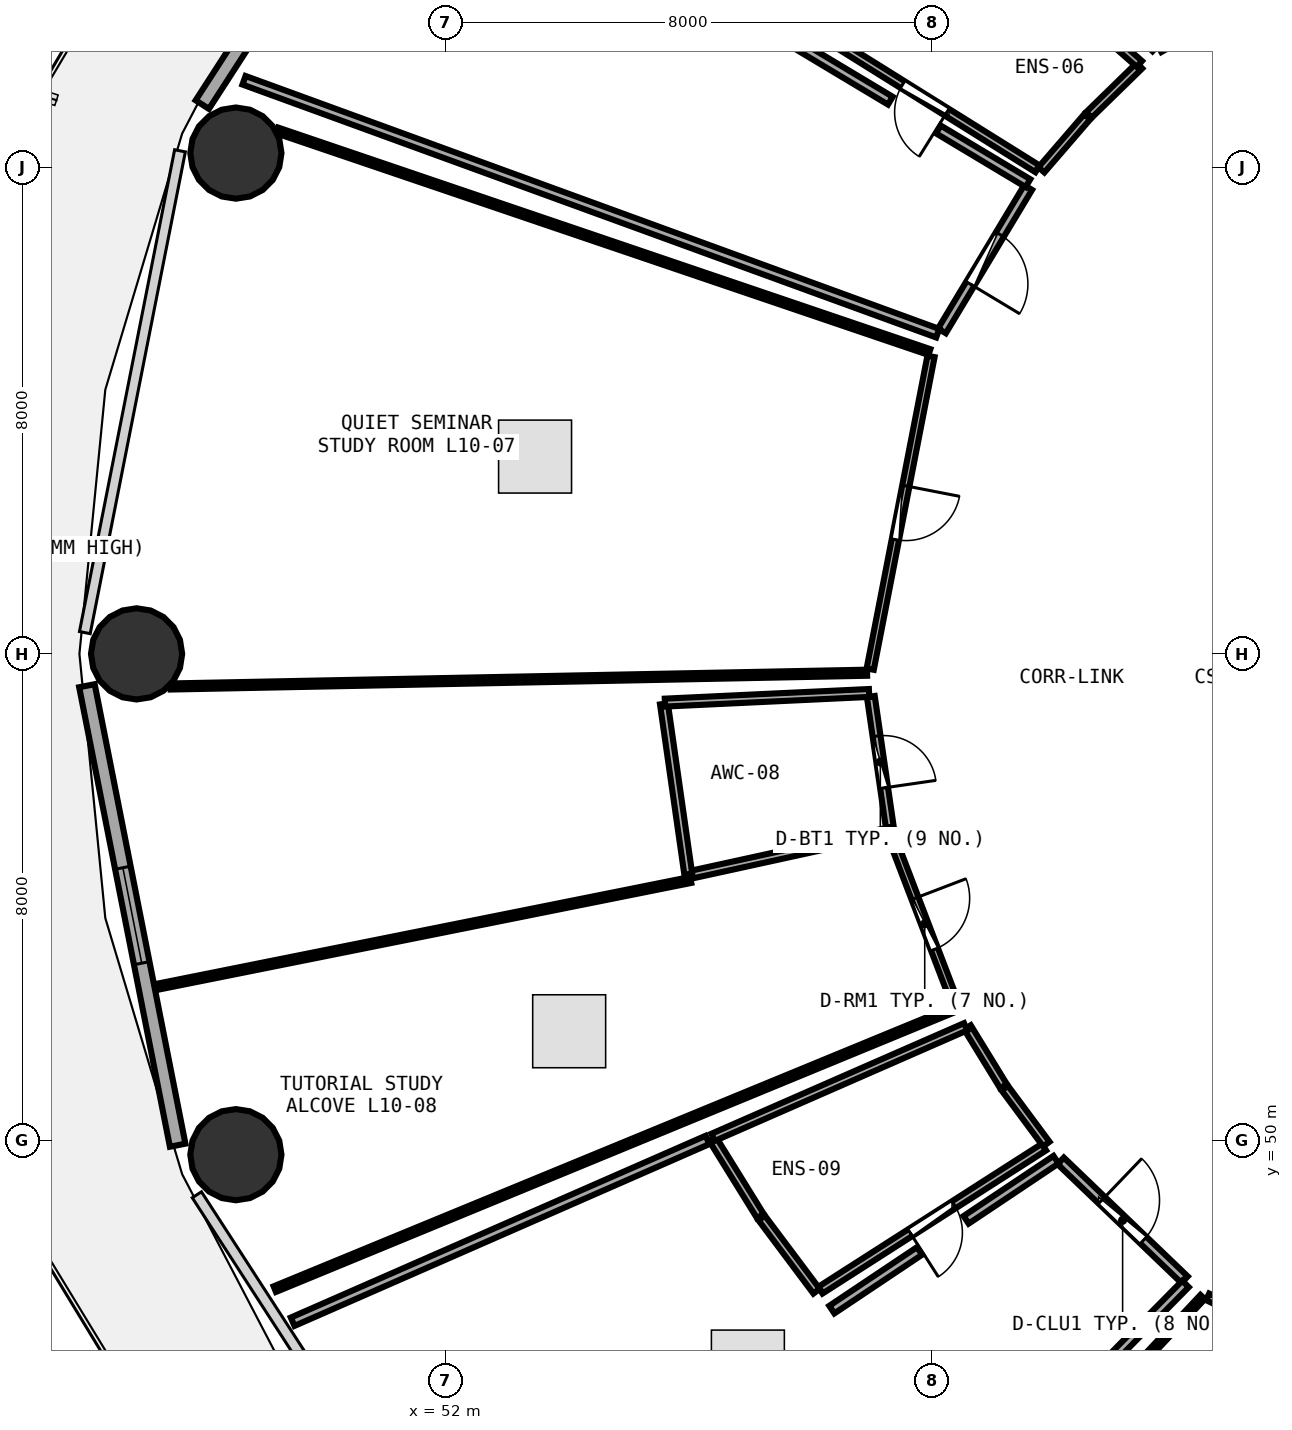
"""IFC4 building model, lengths in metres.
Left out: names, types, materials, properties, quantities, classifications, styles, units other than length and angle.
Written with IfcOpenShell. Run it as: python <this file> out.ifc"""

import sys

from ifc_helpers import new_model, si_unit, direction, frame, frame_2d, origin, origin_2d, place, context, subcontext, project, spatial, rectangle, circle, extrude, element, fill, save


model = new_model("IFC4")
c1 = context("Model", 3, precision=1e-05, world=origin(), true_north=direction((0.0, 1.0)))
c2 = subcontext(c1, "Body", "Model", "MODEL_VIEW")
j1 = project(units=[si_unit("LENGTHUNIT", "METRE"), si_unit("PLANEANGLEUNIT", "RADIAN")], contexts=[c1])
p1 = place(None, origin())
s1 = spatial("IfcSite", under=j1, at=p1, CompositionType="ELEMENT")
p2 = place(p1, origin())
s2 = spatial("IfcBuilding", under=s1, at=p2, CompositionType="ELEMENT")
p3 = place(p2, frame((0.0, 0.0, 41.25)))
s3 = spatial("IfcBuildingStorey", under=s2, at=p3, CompositionType="ELEMENT", Elevation=41.25)
for number, where, z_axis, x_axis in (
    (1, (48.553, 66.236, 0.0), (0.0, 0.0, 1.0), (1.0, 0.0, 0.0)),
    (2, (46.92, 58.0, 0.0), (0.0, 0.0, 1.0), (1.0, 0.0, 0.0)),
    (3, (48.553, 49.764, 0.0), (0.0, 0.0, 1.0), (1.0, 0.0, 0.0)),
):
    element("IfcColumn", number, at=place(p3, frame(where, z_axis=z_axis, x_axis=x_axis)), inside=s3, PredefinedType="COLUMN", context=c2, shape_type="SweptSolid", body=[
        extrude(circle(Radius=0.75, at=origin_2d()), origin(), (0.0, 0.0, 1.0), 3.75),
    ])
p4 = place(p3, frame((52.311, 73.698, 0.0), z_axis=(0.0, 0.0, 1.0), x_axis=(-0.543005114258, -0.839729388488, 0.0)))
e4 = element("IfcWall", 4, at=p4, inside=s3, PredefinedType="SOLIDWALL", context=c2, shape_type="SweptSolid", body=[
    extrude(rectangle(XDim=7.938, YDim=0.26, at=frame_2d((3.969, 0.0))), origin(), (0.0, 0.0, 1.0), 3.475),
])
p5 = place(p4, frame((3.494, 0.0, 0.0)))
e5 = element("IfcOpeningElement", 5, at=p5, cuts=e4, PredefinedType="OPENING", context=c2, shape_type="SweptSolid", body=[
    extrude(rectangle(XDim=0.95, YDim=2.1, at=frame_2d((0.475, 1.05))), frame((0.0, 0.14, 0.0), z_axis=(0.0, -1.0, 0.0), x_axis=(1.0, 0.0, 0.0)), (0.0, 0.0, 1.0), 0.28),
])
p6 = place(p4, frame((4.794, 0.0, 0.85)))
e6 = element("IfcOpeningElement", 6, at=p6, cuts=e4, PredefinedType="OPENING", context=c2, shape_type="SweptSolid", body=[
    extrude(rectangle(XDim=1.2, YDim=1.45, at=frame_2d((0.6, 0.725))), frame((0.0, 0.14, 0.0), z_axis=(0.0, -1.0, 0.0), x_axis=(1.0, 0.0, 0.0)), (0.0, 0.0, 1.0), 0.28),
])
p7 = place(p3, frame((46.104, 57.477, 0.0), z_axis=(0.0, 0.0, 1.0), x_axis=(0.193726159581, -0.98105564322, 0.0)))
e7 = element("IfcWall", 7, at=p7, inside=s3, PredefinedType="SOLIDWALL", context=c2, shape_type="SweptSolid", body=[
    extrude(rectangle(XDim=7.703, YDim=0.26, at=frame_2d((3.851, 0.0))), origin(), (0.0, 0.0, 1.0), 3.475),
])
p8 = place(p7, frame((3.051, 0.0, 0.85)))
e8 = element("IfcOpeningElement", 8, at=p8, cuts=e7, PredefinedType="OPENING", context=c2, shape_type="SweptSolid", body=[
    extrude(rectangle(XDim=1.6, YDim=1.45, at=frame_2d((0.8, 0.725))), frame((0.0, 0.14, 0.0), z_axis=(0.0, -1.0, 0.0), x_axis=(1.0, 0.0, 0.0)), (0.0, 0.0, 1.0), 0.28),
])
p9 = place(p3, frame((61.737, 65.977, 0.0), z_axis=(0.0, 0.0, 1.0), x_axis=(-0.848252205707, 0.529592480605, 0.0)))
e9 = element("IfcWall", 9, at=p9, inside=s3, PredefinedType="PLUMBINGWALL", context=c2, shape_type="SweptSolid", body=[
    extrude(rectangle(XDim=4.374, YDim=0.13, at=frame_2d((2.187, 0.0))), origin(), (0.0, 0.0, 1.0), 3.235),
])
p10 = place(p9, frame((1.757, 0.0, 0.0)))
e10 = element("IfcOpeningElement", 10, at=p10, cuts=e9, PredefinedType="OPENING", context=c2, shape_type="SweptSolid", body=[
    extrude(rectangle(XDim=0.86, YDim=2.05, at=frame_2d((0.43, 1.025))), frame((0.0, 0.075, 0.0), z_axis=(0.0, -1.0, 0.0), x_axis=(1.0, 0.0, 0.0)), (0.0, 0.0, 1.0), 0.15),
])
p11 = place(p3, frame((61.583, 65.67, 0.0), z_axis=(0.0, 0.0, 1.0), x_axis=(-0.515343511704, -0.85698370168, 0.0)))
e11 = element("IfcWall", 11, at=p11, inside=s3, PredefinedType="PARTITIONING", context=c2, shape_type="SweptSolid", body=[
    extrude(rectangle(XDim=2.752, YDim=0.15, at=frame_2d((1.376, 0.0))), origin(), (0.0, 0.0, 1.0), 2.875),
])
p12 = place(p11, frame((0.901, 0.0, 0.0)))
e12 = element("IfcOpeningElement", 12, at=p12, cuts=e11, PredefinedType="OPENING", context=c2, shape_type="SweptSolid", body=[
    extrude(rectangle(XDim=0.95, YDim=2.08, at=frame_2d((0.475, 1.04))), frame((0.0, 0.085, 0.0), z_axis=(0.0, -1.0, 0.0), x_axis=(1.0, 0.0, 0.0)), (0.0, 0.0, 1.0), 0.17),
])
p13 = place(p3, frame((59.986, 62.892, 0.0), z_axis=(0.0, 0.0, 1.0), x_axis=(-0.190897102704, -0.981610053015, 0.0)))
e13 = element("IfcWall", 13, at=p13, inside=s3, PredefinedType="PARTITIONING", context=c2, shape_type="SweptSolid", body=[
    extrude(rectangle(XDim=5.239, YDim=0.12, at=frame_2d((2.619, 0.0))), origin(), (0.0, 0.0, 1.0), 2.875),
])
p14 = place(p13, frame((2.169, 0.0, 0.0)))
e14 = element("IfcOpeningElement", 14, at=p14, cuts=e13, PredefinedType="OPENING", context=c2, shape_type="SweptSolid", body=[
    extrude(rectangle(XDim=0.9, YDim=2.08, at=frame_2d((0.45, 1.04))), frame((0.0, 0.07, 0.0), z_axis=(0.0, -1.0, 0.0), x_axis=(1.0, 0.0, 0.0)), (0.0, 0.0, 1.0), 0.14),
])
p15 = place(p3, frame((58.996, 57.299, 0.0), z_axis=(0.0, 0.0, 1.0), x_axis=(0.143746038715, -0.989614610014, 0.0)))
e15 = element("IfcWall", 15, at=p15, inside=s3, PredefinedType="PLUMBINGWALL", context=c2, shape_type="SweptSolid", body=[
    extrude(rectangle(XDim=2.176, YDim=0.13, at=frame_2d((1.088, 0.0))), origin(), (0.0, 0.0, 1.0), 3.48),
])
p16 = place(p15, frame((0.658, 0.0, 0.0)))
e16 = element("IfcOpeningElement", 16, at=p16, cuts=e15, PredefinedType="OPENING", context=c2, shape_type="SweptSolid", body=[
    extrude(rectangle(XDim=0.86, YDim=2.05, at=frame_2d((0.43, 1.025))), frame((0.0, 0.075, 0.0), z_axis=(0.0, -1.0, 0.0), x_axis=(1.0, 0.0, 0.0)), (0.0, 0.0, 1.0), 0.15),
])
p17 = place(p3, frame((59.373, 54.891, 0.0), z_axis=(0.0, 0.0, 1.0), x_axis=(0.357203455119, -0.934026601147, 0.0)))
e17 = element("IfcWall", 17, at=p17, inside=s3, PredefinedType="PARTITIONING", context=c2, shape_type="SweptSolid", body=[
    extrude(rectangle(XDim=2.848, YDim=0.12, at=frame_2d((1.424, 0.0))), origin(), (0.0, 0.0, 1.0), 3.48),
])
p18 = place(p17, frame((0.974, 0.0, 0.0)))
e18 = element("IfcOpeningElement", 18, at=p18, cuts=e17, PredefinedType="OPENING", context=c2, shape_type="SweptSolid", body=[
    extrude(rectangle(XDim=0.9, YDim=2.08, at=frame_2d((0.45, 1.04))), frame((0.0, 0.07, 0.0), z_axis=(0.0, -1.0, 0.0), x_axis=(1.0, 0.0, 0.0)), (0.0, 0.0, 1.0), 0.14),
])
p19 = place(p3, frame((61.844, 49.89, 0.0), z_axis=(0.0, 0.0, 1.0), x_axis=(-0.842235862163, -0.539109221297, 0.0)))
e19 = element("IfcWall", 19, at=p19, inside=s3, PredefinedType="PLUMBINGWALL", context=c2, shape_type="SweptSolid", body=[
    extrude(rectangle(XDim=4.367, YDim=0.13, at=frame_2d((2.184, 0.0))), origin(), (0.0, 0.0, 1.0), 3.235),
])
p20 = place(p19, frame((1.754, 0.0, 0.0)))
e20 = element("IfcOpeningElement", 20, at=p20, cuts=e19, PredefinedType="OPENING", context=c2, shape_type="SweptSolid", body=[
    extrude(rectangle(XDim=0.86, YDim=2.05, at=frame_2d((0.43, 1.025))), frame((0.0, 0.075, 0.0), z_axis=(0.0, -1.0, 0.0), x_axis=(1.0, 0.0, 0.0)), (0.0, 0.0, 1.0), 0.15),
])
p21 = place(p3, frame((62.118, 49.663, 0.0), z_axis=(0.0, 0.0, 1.0), x_axis=(0.721698326825, -0.692207718144, 0.0)))
e21 = element("IfcWall", 21, at=p21, inside=s3, PredefinedType="PARTITIONING", context=c2, shape_type="SweptSolid", body=[
    extrude(rectangle(XDim=2.823, YDim=0.15, at=frame_2d((1.412, 0.0))), origin(), (0.0, 0.0, 1.0), 2.875),
])
p22 = place(p21, frame((0.936, 0.0, 0.0)))
e22 = element("IfcOpeningElement", 22, at=p22, cuts=e21, PredefinedType="OPENING", context=c2, shape_type="SweptSolid", body=[
    extrude(rectangle(XDim=0.95, YDim=2.08, at=frame_2d((0.475, 1.04))), frame((0.0, 0.085, 0.0), z_axis=(0.0, -1.0, 0.0), x_axis=(1.0, 0.0, 0.0)), (0.0, 0.0, 1.0), 0.17),
])
p23 = place(p3, frame((64.534, 47.427, 0.0), z_axis=(0.0, 0.0, 1.0), x_axis=(0.900751487373, -0.434334845477, 0.0)))
e23 = element("IfcWall", 23, at=p23, inside=s3, PredefinedType="PARTITIONING", context=c2, shape_type="SweptSolid", body=[
    extrude(rectangle(XDim=5.654, YDim=0.12, at=frame_2d((2.827, 0.0))), origin(), (0.0, 0.0, 1.0), 2.875),
])
p24 = place(p23, frame((2.377, 0.0, 0.0)))
e24 = element("IfcOpeningElement", 24, at=p24, cuts=e23, PredefinedType="OPENING", context=c2, shape_type="SweptSolid", body=[
    extrude(rectangle(XDim=0.9, YDim=2.08, at=frame_2d((0.45, 1.04))), frame((0.0, 0.07, 0.0), z_axis=(0.0, -1.0, 0.0), x_axis=(1.0, 0.0, 0.0)), (0.0, 0.0, 1.0), 0.14),
])
p25 = place(p3, frame((63.414, 67.674, 0.0), z_axis=(0.0, 0.0, 1.0), x_axis=(-0.715868961368, -0.698234652642, 0.0)))
e25 = element("IfcWall", 25, at=p25, inside=s3, PredefinedType="PLUMBINGWALL", context=c2, shape_type="SweptSolid", body=[
    extrude(rectangle(XDim=1.163, YDim=0.13, at=frame_2d((0.582, 0.0))), origin(), (0.0, 0.0, 1.0), 2.875),
])
p26 = place(p3, frame((62.554, 66.833, 0.0), z_axis=(0.0, 0.0, 1.0), x_axis=(-0.6531951623, -0.757189593133, 0.0)))
e26 = element("IfcWall", 26, at=p26, inside=s3, PredefinedType="PLUMBINGWALL", context=c2, shape_type="SweptSolid", body=[
    extrude(rectangle(XDim=1.153, YDim=0.13, at=frame_2d((0.576, 0.0))), origin(), (0.0, 0.0, 1.0), 3.48),
])
p27 = place(p3, frame((60.143, 70.577, 0.0), z_axis=(0.0, 0.0, 1.0), x_axis=(0.750928130077, -0.660383936403, 0.0)))
e27 = element("IfcWall", 27, at=p27, inside=s3, PredefinedType="PLUMBINGWALL", context=c2, shape_type="SweptSolid", body=[
    extrude(rectangle(XDim=4.355, YDim=0.13, at=frame_2d((2.177, 0.0))), origin(), (0.0, 0.0, 1.0), 3.235),
])
p28 = place(p3, frame((60.096, 63.274, 0.0), z_axis=(0.0, 0.0, 1.0), x_axis=(-0.939512545551, 0.342514491304, 0.0)))
e28 = element("IfcWall", 28, at=p28, inside=s3, PredefinedType="PARTITIONING", context=c2, shape_type="SweptSolid", body=[
    extrude(rectangle(XDim=12.145, YDim=0.15, at=frame_2d((6.072, 0.0))), origin(), (0.0, 0.0, 1.0), 2.875),
])
p29 = place(p3, frame((57.75, 68.036, 0.0), z_axis=(0.0, 0.0, 1.0), x_axis=(0.857787746423, -0.514004068161, 0.0)))
e29 = element("IfcWall", 29, at=p29, inside=s3, PredefinedType="PARTITIONING", context=c2, shape_type="SweptSolid", body=[
    extrude(rectangle(XDim=1.826, YDim=0.15, at=frame_2d((0.913, 0.0))), origin(), (0.0, 0.0, 1.0), 3.48),
])
p30 = place(p3, frame((60.106, 66.625, 0.0), z_axis=(0.0, 0.0, 1.0), x_axis=(0.8577560852, -0.514056901814, 0.0)))
e30 = element("IfcWall", 30, at=p30, inside=s3, PredefinedType="PARTITIONING", context=c2, shape_type="SweptSolid", body=[
    extrude(rectangle(XDim=1.718, YDim=0.15, at=frame_2d((0.859, 0.0))), origin(), (0.0, 0.0, 1.0), 3.235),
])
p31 = place(p3, frame((58.934, 57.69, 0.0), z_axis=(0.0, 0.0, 1.0), x_axis=(-0.999804870307, -0.019754020094, 0.0)))
e31 = element("IfcWall", 31, at=p31, inside=s3, PredefinedType="PARTITIONING", context=c2, shape_type="SweptSolid", body=[
    extrude(rectangle(XDim=11.457, YDim=0.1, at=frame_2d((5.729, 0.0))), origin(), (0.0, 0.0, 1.0), 3.175),
])
p32 = place(p3, frame((49.233, 66.608, 0.0), z_axis=(0.0, 0.0, 1.0), x_axis=(0.946848647549, -0.321679403499, 0.0)))
e32 = element("IfcWall", 32, at=p32, inside=s3, PredefinedType="PARTITIONING", context=c2, shape_type="SweptSolid", body=[
    extrude(rectangle(XDim=11.328, YDim=0.1, at=frame_2d((5.664, 0.0))), origin(), (0.0, 0.0, 1.0), 2.875),
])
p33 = place(p3, frame((59.298, 55.082, 0.0), z_axis=(0.0, 0.0, 1.0), x_axis=(-0.97686777226, -0.213844231907, 0.0)))
e33 = element("IfcWall", 33, at=p33, inside=s3, PredefinedType="PLUMBINGWALL", context=c2, shape_type="SweptSolid", body=[
    extrude(rectangle(XDim=3.36, YDim=0.13, at=frame_2d((1.68, 0.0))), origin(), (0.0, 0.0, 1.0), 3.235),
])
p34 = place(p3, frame((55.993, 54.379, 0.0), z_axis=(0.0, 0.0, 1.0), x_axis=(-0.141590572172, 0.989925305198, 0.0)))
e34 = element("IfcWall", 34, at=p34, inside=s3, PredefinedType="PLUMBINGWALL", context=c2, shape_type="SweptSolid", body=[
    extrude(rectangle(XDim=2.828, YDim=0.13, at=frame_2d((1.414, 0.0))), origin(), (0.0, 0.0, 1.0), 3.48),
])
p35 = place(p3, frame((55.61, 57.199, 0.0), z_axis=(0.0, 0.0, 1.0), x_axis=(0.998891356447, 0.04707502538, 0.0)))
e35 = element("IfcWall", 35, at=p35, inside=s3, PredefinedType="PLUMBINGWALL", context=c2, shape_type="SweptSolid", body=[
    extrude(rectangle(XDim=3.361, YDim=0.13, at=frame_2d((1.68, 0.0))), origin(), (0.0, 0.0, 1.0), 3.235),
])
p36 = place(p3, frame((60.375, 52.16, 0.0), z_axis=(0.0, 0.0, 1.0), x_axis=(-0.924608681042, -0.380918346817, 0.0)))
e36 = element("IfcWall", 36, at=p36, inside=s3, PredefinedType="PARTITIONING", context=c2, shape_type="SweptSolid", body=[
    extrude(rectangle(XDim=12.094, YDim=0.1, at=frame_2d((6.047, 0.0))), origin(), (0.0, 0.0, 1.0), 2.875),
])
p37 = place(p3, frame((47.257, 52.525, 0.0), z_axis=(0.0, 0.0, 1.0), x_axis=(0.980535537362, 0.196341691878, 0.0)))
e37 = element("IfcWall", 37, at=p37, inside=s3, PredefinedType="PARTITIONING", context=c2, shape_type="SweptSolid", body=[
    extrude(rectangle(XDim=8.95, YDim=0.1, at=frame_2d((4.475, 0.0))), origin(), (0.0, 0.0, 1.0), 2.875),
])
p38 = place(p3, frame((60.583, 51.859, 0.0), z_axis=(0.0, 0.0, 1.0), x_axis=(0.52310141153, -0.852270446077, 0.0)))
e38 = element("IfcWall", 38, at=p38, inside=s3, PredefinedType="PLUMBINGWALL", context=c2, shape_type="SweptSolid", body=[
    extrude(rectangle(XDim=1.135, YDim=0.13, at=frame_2d((0.568, 0.0))), origin(), (0.0, 0.0, 1.0), 3.48),
])
p39 = place(p3, frame((61.2, 50.858, 0.0), z_axis=(0.0, 0.0, 1.0), x_axis=(0.595625136946, -0.803262532574, 0.0)))
e39 = element("IfcWall", 39, at=p39, inside=s3, PredefinedType="PLUMBINGWALL", context=c2, shape_type="SweptSolid", body=[
    extrude(rectangle(XDim=1.145, YDim=0.13, at=frame_2d((0.573, 0.0))), origin(), (0.0, 0.0, 1.0), 2.875),
])
p40 = place(p3, frame((58.103, 47.519, 0.0), z_axis=(0.0, 0.0, 1.0), x_axis=(-0.599662382917, 0.800253101533, 0.0)))
e40 = element("IfcWall", 40, at=p40, inside=s3, PredefinedType="PLUMBINGWALL", context=c2, shape_type="SweptSolid", body=[
    extrude(rectangle(XDim=1.504, YDim=0.13, at=frame_2d((0.752, 0.0))), origin(), (0.0, 0.0, 1.0), 3.48),
])
p41 = place(p3, frame((57.178, 48.756, 0.0), z_axis=(0.0, 0.0, 1.0), x_axis=(-0.526861637299, 0.849951066323, 0.0)))
e41 = element("IfcWall", 41, at=p41, inside=s3, PredefinedType="PLUMBINGWALL", context=c2, shape_type="SweptSolid", body=[
    extrude(rectangle(XDim=1.492, YDim=0.13, at=frame_2d((0.746, 0.0))), origin(), (0.0, 0.0, 1.0), 3.48),
])
p42 = place(p3, frame((56.4, 50.049, 0.0), z_axis=(0.0, 0.0, 1.0), x_axis=(0.91604857307, 0.401067340701, 0.0)))
e42 = element("IfcWall", 42, at=p42, inside=s3, PredefinedType="PLUMBINGWALL", context=c2, shape_type="SweptSolid", body=[
    extrude(rectangle(XDim=4.535, YDim=0.13, at=frame_2d((2.268, 0.0))), origin(), (0.0, 0.0, 1.0), 2.875),
])
p43 = place(p3, frame((64.171, 47.638, 0.0), z_axis=(0.0, 0.0, 1.0), x_axis=(-0.702465266663, -0.711718026421, 0.0)))
e43 = element("IfcWall", 43, at=p43, inside=s3, PredefinedType="PARTITIONING", context=c2, shape_type="SweptSolid", body=[
    extrude(rectangle(XDim=11.478, YDim=0.15, at=frame_2d((5.739, 0.0))), origin(), (0.0, 0.0, 1.0), 2.875),
])
p44 = place(p3, frame((49.487, 47.017, 0.0), z_axis=(0.0, 0.0, 1.0), x_axis=(0.915920983282, 0.401358633124, 0.0)))
e44 = element("IfcWall", 44, at=p44, inside=s3, PredefinedType="PARTITIONING", context=c2, shape_type="SweptSolid", body=[
    extrude(rectangle(XDim=7.449, YDim=0.15, at=frame_2d((3.725, 0.0))), origin(), (0.0, 0.0, 1.0), 2.875),
])
p45 = place(p3, frame((58.354, 47.216, 0.0), z_axis=(0.0, 0.0, 1.0), x_axis=(0.831292382958, 0.555835383937, 0.0)))
e45 = element("IfcWall", 45, at=p45, inside=s3, PredefinedType="PARTITIONING", context=c2, shape_type="SweptSolid", body=[
    extrude(rectangle(XDim=1.736, YDim=0.15, at=frame_2d((0.868, 0.0))), origin(), (0.0, 0.0, 1.0), 3.48),
])
p46 = place(p3, frame((60.563, 48.693, 0.0), z_axis=(0.0, 0.0, 1.0), x_axis=(0.831268380724, 0.555871279352, 0.0)))
e46 = element("IfcWall", 46, at=p46, inside=s3, PredefinedType="PARTITIONING", context=c2, shape_type="SweptSolid", body=[
    extrude(rectangle(XDim=1.779, YDim=0.15, at=frame_2d((0.89, 0.0))), origin(), (0.0, 0.0, 1.0), 3.235),
])
p47 = place(p3, frame((56.622, 39.085, 0.0), z_axis=(0.0, 0.0, 1.0), x_axis=(0.684539394854, 0.728975868526, 0.0)))
e47 = element("IfcWall", 47, at=p47, inside=s3, PredefinedType="PARTITIONING", context=c2, shape_type="SweptSolid", body=[
    extrude(rectangle(XDim=11.439, YDim=0.1, at=frame_2d((5.719, 0.0))), origin(), (0.0, 0.0, 1.0), 2.875),
])
p48 = place(p8, origin())
e48 = element("IfcWindow", 48, at=p48, inside=s3, PartitioningType="SINGLE_PANEL", PredefinedType="WINDOW", context=c2, shape_type="SweptSolid", body=[
    extrude(rectangle(XDim=1.6, YDim=1.45, at=frame_2d((0.8, 0.725))), frame((0.0, 0.03, 0.0), z_axis=(0.0, -1.0, 0.0), x_axis=(1.0, 0.0, 0.0)), (0.0, 0.0, 1.0), 0.06),
])
fill(e8, e48)
p49 = place(p10, origin())
e49 = element("IfcDoor", 49, at=p49, inside=s3, OperationType="SINGLE_SWING_LEFT", PredefinedType="DOOR", context=c2, shape_type="SweptSolid", body=[
    extrude(rectangle(XDim=0.86, YDim=2.05, at=frame_2d((0.43, 1.025))), frame((0.0, 0.025, 0.0), z_axis=(0.0, -1.0, 0.0), x_axis=(1.0, 0.0, 0.0)), (0.0, 0.0, 1.0), 0.05),
])
fill(e10, e49)
p50 = place(p12, origin())
e50 = element("IfcDoor", 50, at=p50, inside=s3, OperationType="SINGLE_SWING_RIGHT", PredefinedType="DOOR", context=c2, shape_type="SweptSolid", body=[
    extrude(rectangle(XDim=0.95, YDim=2.08, at=frame_2d((0.475, 1.04))), frame((0.0, 0.025, 0.0), z_axis=(0.0, -1.0, 0.0), x_axis=(1.0, 0.0, 0.0)), (0.0, 0.0, 1.0), 0.05),
])
fill(e12, e50)
p51 = place(p14, origin())
e51 = element("IfcDoor", 51, at=p51, inside=s3, OperationType="SINGLE_SWING_LEFT", PredefinedType="DOOR", context=c2, shape_type="SweptSolid", body=[
    extrude(rectangle(XDim=0.9, YDim=2.08, at=frame_2d((0.45, 1.04))), frame((0.0, 0.025, 0.0), z_axis=(0.0, -1.0, 0.0), x_axis=(1.0, 0.0, 0.0)), (0.0, 0.0, 1.0), 0.05),
])
fill(e14, e51)
p52 = place(p16, origin())
e52 = element("IfcDoor", 52, at=p52, inside=s3, OperationType="SINGLE_SWING_RIGHT", PredefinedType="DOOR", context=c2, shape_type="SweptSolid", body=[
    extrude(rectangle(XDim=0.86, YDim=2.05, at=frame_2d((0.43, 1.025))), frame((0.0, 0.025, 0.0), z_axis=(0.0, -1.0, 0.0), x_axis=(1.0, 0.0, 0.0)), (0.0, 0.0, 1.0), 0.05),
])
fill(e16, e52)
p53 = place(p18, origin())
e53 = element("IfcDoor", 53, at=p53, inside=s3, OperationType="SINGLE_SWING_LEFT", PredefinedType="DOOR", context=c2, shape_type="SweptSolid", body=[
    extrude(rectangle(XDim=0.9, YDim=2.08, at=frame_2d((0.45, 1.04))), frame((0.0, 0.025, 0.0), z_axis=(0.0, -1.0, 0.0), x_axis=(1.0, 0.0, 0.0)), (0.0, 0.0, 1.0), 0.05),
])
fill(e18, e53)
p54 = place(p20, origin())
e54 = element("IfcDoor", 54, at=p54, inside=s3, OperationType="SINGLE_SWING_RIGHT", PredefinedType="DOOR", context=c2, shape_type="SweptSolid", body=[
    extrude(rectangle(XDim=0.86, YDim=2.05, at=frame_2d((0.43, 1.025))), frame((0.0, 0.025, 0.0), z_axis=(0.0, -1.0, 0.0), x_axis=(1.0, 0.0, 0.0)), (0.0, 0.0, 1.0), 0.05),
])
fill(e20, e54)
p55 = place(p22, origin())
e55 = element("IfcDoor", 55, at=p55, inside=s3, OperationType="SINGLE_SWING_LEFT", PredefinedType="DOOR", context=c2, shape_type="SweptSolid", body=[
    extrude(rectangle(XDim=0.95, YDim=2.08, at=frame_2d((0.475, 1.04))), frame((0.0, 0.025, 0.0), z_axis=(0.0, -1.0, 0.0), x_axis=(1.0, 0.0, 0.0)), (0.0, 0.0, 1.0), 0.05),
])
fill(e22, e55)
save(model, sys.argv[1])
